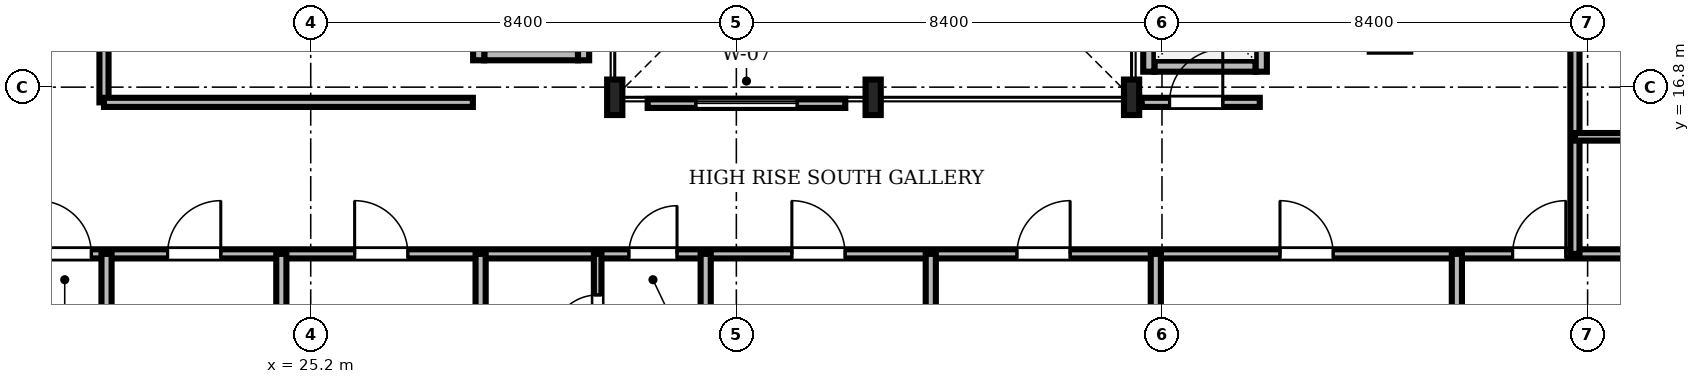
"""IFC4 building model, lengths in metres.
Left out: names, types, materials, properties, quantities, classifications, styles, units other than length and angle.
Written with IfcOpenShell. Run it as: python <this file> out.ifc"""

import sys

from ifc_helpers import new_model, si_unit, direction, frame, frame_2d, origin, origin_2d, place, context, subcontext, project, spatial, rectangle, i_section, extrude, source, transform, mapped, element, fill, save


model = new_model("IFC4")
c1 = context("Model", 3, precision=1e-05, world=origin(), true_north=direction((0.0, 1.0)))
c2 = subcontext(c1, "Body", "Model", "MODEL_VIEW")
j1 = project(units=[si_unit("LENGTHUNIT", "METRE"), si_unit("PLANEANGLEUNIT", "RADIAN")], contexts=[c1])
p1 = place(None, origin())
s1 = spatial("IfcSite", under=j1, at=p1, CompositionType="ELEMENT")
p2 = place(p1, origin())
s2 = spatial("IfcBuilding", under=s1, at=p2, CompositionType="ELEMENT")
p3 = place(p2, frame((0.0, 0.0, 214.8)))
s3 = spatial("IfcBuildingStorey", under=s2, at=p3, CompositionType="ELEMENT", Elevation=214.8)
m1 = source(origin(), c2, "Body", "SweptSolid", [
    extrude(i_section(OverallWidth=0.3, OverallDepth=0.7, WebThickness=0.017, FlangeThickness=0.032, FilletRadius=0.027, at=origin_2d()), origin(), (0.0, 0.0, 1.0), 3.53),
])
for number, where, z_axis, x_axis in (
    (1, (31.2, 16.6, 0.0), (0.0, 0.0, 1.0), (1.0, 0.0, 0.0)),
    (2, (36.3, 16.6, 0.0), (0.0, 0.0, 1.0), (1.0, 0.0, 0.0)),
    (3, (41.4, 16.6, 0.0), (0.0, 0.0, 1.0), (1.0, 0.0, 0.0)),
):
    element("IfcColumn", number, at=place(p3, frame(where, z_axis=z_axis, x_axis=x_axis)), inside=s3, PredefinedType="COLUMN", context=c2, shape_type="MappedRepresentation", body=[
        mapped(m1, transform((0.0, 0.0, 0.0), scale=1.0)),
    ])
m2 = source(origin(), c2, "Body", "SweptSolid", [
    extrude(rectangle(XDim=2.0, YDim=0.22, at=frame_2d((1.0, 0.0))), origin(), (0.0, 0.0, 1.0), 3.53),
])
p4 = place(p3, frame((41.85, 17.215, 0.0), z_axis=(0.0, 0.0, 1.0), x_axis=(1.0, 0.0, 0.0)))
e4 = element("IfcWall", 4, at=p4, inside=s3, PredefinedType="SOLIDWALL", context=c2, shape_type="MappedRepresentation", body=[
    mapped(m2, transform((0.0, 0.0, 0.0), scale=1.0)),
])
m3 = source(origin(), c2, "Body", "SweptSolid", [
    extrude(rectangle(XDim=2.19, YDim=0.22, at=frame_2d((1.095, 0.0))), origin(), (0.0, 0.0, 1.0), 3.53),
])
p5 = place(p3, frame((41.74, 17.105, 0.0), z_axis=(0.0, 0.0, 1.0), x_axis=(0.0, 1.0, 0.0)))
e5 = element("IfcWall", 5, at=p5, inside=s3, PredefinedType="SOLIDWALL", context=c2, shape_type="MappedRepresentation", body=[
    mapped(m3, transform((0.0, 0.0, 0.0), scale=1.0)),
])
p6 = place(p3, frame((43.96, 17.105, 0.0), z_axis=(0.0, 0.0, 1.0), x_axis=(0.0, 1.0, 0.0)))
e6 = element("IfcWall", 6, at=p6, inside=s3, PredefinedType="SOLIDWALL", context=c2, shape_type="MappedRepresentation", body=[
    mapped(m3, transform((0.0, 0.0, 0.0), scale=1.0)),
])
m4 = source(origin(), c2, "Body", "SweptSolid", [
    extrude(rectangle(XDim=1.1, YDim=2.2, at=frame_2d((0.55, 1.1))), frame((0.0, 0.12, 0.0), z_axis=(0.0, -1.0, 0.0), x_axis=(1.0, 0.0, 0.0)), (0.0, 0.0, 1.0), 0.24),
])
p7 = place(p6, frame((0.545, 0.0, 0.0)))
e7 = element("IfcOpeningElement", 7, at=p7, cuts=e6, PredefinedType="OPENING", context=c2, shape_type="MappedRepresentation", body=[
    mapped(m4, transform((0.0, 0.0, 0.0), scale=1.0)),
])
m5 = source(origin(), c2, "Body", "SweptSolid", [
    extrude(rectangle(XDim=1.85, YDim=0.22, at=frame_2d((0.925, 0.0))), origin(), (0.0, 0.0, 1.0), 2.972),
])
p8 = place(p3, frame((28.625, 17.44, 0.0), z_axis=(0.0, 0.0, 1.0), x_axis=(1.0, 0.0, 0.0)))
e8 = element("IfcWall", 8, at=p8, inside=s3, PredefinedType="SOLIDWALL", context=c2, shape_type="MappedRepresentation", body=[
    mapped(m5, transform((0.0, 0.0, 0.0), scale=1.0)),
])
m6 = source(origin(), c2, "Body", "SweptSolid", [
    extrude(rectangle(XDim=2.54, YDim=0.22, at=frame_2d((1.27, 0.0))), origin(), (0.0, 0.0, 1.0), 2.972),
])
p9 = place(p3, frame((28.515, 17.33, 0.0), z_axis=(0.0, 0.0, 1.0), x_axis=(0.0, 1.0, 0.0)))
e9 = element("IfcWall", 9, at=p9, inside=s3, PredefinedType="SOLIDWALL", context=c2, shape_type="MappedRepresentation", body=[
    mapped(m6, transform((0.0, 0.0, 0.0), scale=1.0)),
])
m7 = source(origin(), c2, "Body", "SweptSolid", [
    extrude(rectangle(XDim=2.54, YDim=0.22, at=frame_2d((1.27, 0.0))), origin(), (0.0, 0.0, 1.0), 3.53),
])
p10 = place(p3, frame((30.585, 17.33, 0.0), z_axis=(0.0, 0.0, 1.0), x_axis=(0.0, 1.0, 0.0)))
e10 = element("IfcWall", 10, at=p10, inside=s3, PredefinedType="SOLIDWALL", context=c2, shape_type="MappedRepresentation", body=[
    mapped(m7, transform((0.0, 0.0, 0.0), scale=1.0)),
])
m8 = source(origin(), c2, "Body", "SweptSolid", [
    extrude(rectangle(XDim=46.156, YDim=0.18, at=frame_2d((23.078, 0.0))), origin(), (0.0, 0.0, 1.0), 2.772),
])
p11 = place(p3, frame((11.422, 13.51, 0.0), z_axis=(0.0, 0.0, 1.0), x_axis=(1.0, 0.0, 0.0)))
e11 = element("IfcWall", 11, at=p11, inside=s3, PredefinedType="PARTITIONING", context=c2, shape_type="MappedRepresentation", body=[
    mapped(m8, transform((0.0, 0.0, 0.0), scale=1.0)),
])
m9 = source(origin(), c2, "Body", "SweptSolid", [
    extrude(rectangle(XDim=1.05, YDim=2.2, at=frame_2d((0.525, 1.1))), frame((0.0, 0.1, 0.0), z_axis=(0.0, -1.0, 0.0), x_axis=(1.0, 0.0, 0.0)), (0.0, 0.0, 1.0), 0.2),
])
p12 = place(p11, frame((8.398, 0.0, 0.0)))
e12 = element("IfcOpeningElement", 12, at=p12, cuts=e11, PredefinedType="OPENING", context=c2, shape_type="MappedRepresentation", body=[
    mapped(m9, transform((0.0, 0.0, 0.0), scale=1.0)),
])
p13 = place(p11, frame((10.953, 0.0, 0.0)))
e13 = element("IfcOpeningElement", 13, at=p13, cuts=e11, PredefinedType="OPENING", context=c2, shape_type="MappedRepresentation", body=[
    mapped(m9, transform((0.0, 0.0, 0.0), scale=1.0)),
])
p14 = place(p11, frame((14.645, 0.0, 0.0)))
e14 = element("IfcOpeningElement", 14, at=p14, cuts=e11, PredefinedType="OPENING", context=c2, shape_type="MappedRepresentation", body=[
    mapped(m9, transform((0.0, 0.0, 0.0), scale=1.0)),
])
m10 = source(origin(), c2, "Body", "SweptSolid", [
    extrude(rectangle(XDim=0.95, YDim=2.15, at=frame_2d((0.475, 1.075))), frame((0.0, 0.1, 0.0), z_axis=(0.0, -1.0, 0.0), x_axis=(1.0, 0.0, 0.0)), (0.0, 0.0, 1.0), 0.2),
])
p15 = place(p11, frame((20.057, 0.0, 0.0)))
e15 = element("IfcOpeningElement", 15, at=p15, cuts=e11, PredefinedType="OPENING", context=c2, shape_type="MappedRepresentation", body=[
    mapped(m10, transform((0.0, 0.0, 0.0), scale=1.0)),
])
p16 = place(p11, frame((23.274, 0.0, 0.0)))
e16 = element("IfcOpeningElement", 16, at=p16, cuts=e11, PredefinedType="OPENING", context=c2, shape_type="MappedRepresentation", body=[
    mapped(m9, transform((0.0, 0.0, 0.0), scale=1.0)),
])
p17 = place(p11, frame((27.716, 0.0, 0.0)))
e17 = element("IfcOpeningElement", 17, at=p17, cuts=e11, PredefinedType="OPENING", context=c2, shape_type="MappedRepresentation", body=[
    mapped(m9, transform((0.0, 0.0, 0.0), scale=1.0)),
])
p18 = place(p11, frame((32.907, 0.0, 0.0)))
e18 = element("IfcOpeningElement", 18, at=p18, cuts=e11, PredefinedType="OPENING", context=c2, shape_type="MappedRepresentation", body=[
    mapped(m9, transform((0.0, 0.0, 0.0), scale=1.0)),
])
p19 = place(p11, frame((37.498, 0.0, 0.0)))
e19 = element("IfcOpeningElement", 19, at=p19, cuts=e11, PredefinedType="OPENING", context=c2, shape_type="MappedRepresentation", body=[
    mapped(m9, transform((0.0, 0.0, 0.0), scale=1.0)),
])
m11 = source(origin(), c2, "Body", "SweptSolid", [
    extrude(rectangle(XDim=27.59, YDim=0.18, at=frame_2d((13.795, 0.0))), origin(), (0.0, 0.0, 1.0), 2.972),
])
p20 = place(p3, frame((50.15, 13.51, 0.0), z_axis=(0.0, 0.0, 1.0), x_axis=(0.0, 1.0, 0.0)))
e20 = element("IfcWall", 20, at=p20, inside=s3, PredefinedType="PARTITIONING", context=c2, shape_type="MappedRepresentation", body=[
    mapped(m11, transform((0.0, 0.0, 0.0), scale=1.0)),
])
p21 = place(p20, frame((4.086, 0.0, 0.0)))
e21 = element("IfcOpeningElement", 21, at=p21, cuts=e20, PredefinedType="OPENING", context=c2, shape_type="MappedRepresentation", body=[
    mapped(m9, transform((0.0, 0.0, 0.0), scale=1.0)),
])
p22 = place(p20, frame((9.744, 0.0, 0.0)))
e22 = element("IfcOpeningElement", 22, at=p22, cuts=e20, PredefinedType="OPENING", context=c2, shape_type="MappedRepresentation", body=[
    mapped(m9, transform((0.0, 0.0, 0.0), scale=1.0)),
])
p23 = place(p20, frame((17.771, 0.0, 0.0)))
e23 = element("IfcOpeningElement", 23, at=p23, cuts=e20, PredefinedType="OPENING", context=c2, shape_type="MappedRepresentation", body=[
    mapped(m9, transform((0.0, 0.0, 0.0), scale=1.0)),
])
p24 = place(p20, frame((24.614, 0.0, 0.0)))
e24 = element("IfcOpeningElement", 24, at=p24, cuts=e20, PredefinedType="OPENING", context=c2, shape_type="MappedRepresentation", body=[
    mapped(m9, transform((0.0, 0.0, 0.0), scale=1.0)),
])
m12 = source(origin(), c2, "Body", "SweptSolid", [
    extrude(rectangle(XDim=5.4, YDim=0.18, at=frame_2d((2.7, 0.0))), origin(), (0.0, 0.0, 1.0), 2.972),
])
p25 = place(p3, frame((21.12, 16.5, 0.0), z_axis=(0.0, 0.0, 1.0), x_axis=(0.0, 1.0, 0.0)))
e25 = element("IfcWall", 25, at=p25, inside=s3, PredefinedType="PARTITIONING", context=c2, shape_type="MappedRepresentation", body=[
    mapped(m12, transform((0.0, 0.0, 0.0), scale=1.0)),
])
p26 = place(p25, frame((2.0, 0.0, 0.0)))
e26 = element("IfcOpeningElement", 26, at=p26, cuts=e25, PredefinedType="OPENING", context=c2, shape_type="MappedRepresentation", body=[
    mapped(m9, transform((0.0, 0.0, 0.0), scale=1.0)),
])
m13 = source(origin(), c2, "Body", "SweptSolid", [
    extrude(rectangle(XDim=2.36, YDim=0.15, at=frame_2d((1.18, 0.0))), origin(), (0.0, 0.0, 1.0), 2.972),
])
p27 = place(p3, frame((30.863, 11.15, 0.0), z_axis=(0.0, 0.0, 1.0), x_axis=(0.0, 1.0, 0.0)))
e27 = element("IfcWall", 27, at=p27, inside=s3, PredefinedType="PARTITIONING", context=c2, shape_type="MappedRepresentation", body=[
    mapped(m13, transform((0.0, 0.0, 0.0), scale=1.0)),
])
m14 = source(origin(), c2, "Body", "SweptSolid", [
    extrude(rectangle(XDim=0.9, YDim=2.1, at=frame_2d((0.45, 1.05))), frame((0.0, 0.085, 0.0), z_axis=(0.0, -1.0, 0.0), x_axis=(1.0, 0.0, 0.0)), (0.0, 0.0, 1.0), 0.17),
])
p28 = place(p27, frame((0.65, 0.0, 0.0)))
e28 = element("IfcOpeningElement", 28, at=p28, cuts=e27, PredefinedType="OPENING", context=c2, shape_type="MappedRepresentation", body=[
    mapped(m14, transform((0.0, 0.0, 0.0), scale=1.0)),
])
m15 = source(origin(), c2, "Body", "SweptSolid", [
    extrude(rectangle(XDim=2.33, YDim=0.18, at=frame_2d((1.165, 0.0))), origin(), (0.0, 0.0, 1.0), 2.972),
])
p29 = place(p3, frame((41.6, 16.5, 0.0), z_axis=(0.0, 0.0, 1.0), x_axis=(1.0, 0.0, 0.0)))
e29 = element("IfcWall", 29, at=p29, inside=s3, PredefinedType="PARTITIONING", context=c2, shape_type="MappedRepresentation", body=[
    mapped(m15, transform((0.0, 0.0, 0.0), scale=1.0)),
])
p30 = place(p29, frame((0.55, 0.0, 0.0)))
e30 = element("IfcOpeningElement", 30, at=p30, cuts=e29, PredefinedType="OPENING", context=c2, shape_type="MappedRepresentation", body=[
    mapped(m9, transform((0.0, 0.0, 0.0), scale=1.0)),
])
m16 = source(origin(), c2, "Body", "SweptSolid", [
    extrude(rectangle(XDim=11.388, YDim=0.2, at=frame_2d((5.694, 0.0))), origin(), (0.0, 0.0, 1.0), 2.772),
])
for number, where, z_axis, x_axis in (
    (31, (21.17, 2.122, 0.0), (0.0, 0.0, 1.0), (0.0, 1.0, 0.0)),
    (32, (24.62, 2.122, 0.0), (0.0, 0.0, 1.0), (0.0, 1.0, 0.0)),
    (33, (28.553, 2.122, 0.0), (0.0, 0.0, 1.0), (0.0, 1.0, 0.0)),
):
    element("IfcWall", number, at=place(p3, frame(where, z_axis=z_axis, x_axis=x_axis)), inside=s3, PredefinedType="PARTITIONING", context=c2, shape_type="MappedRepresentation", body=[
        mapped(m16, transform((0.0, 0.0, 0.0), scale=1.0)),
    ])
m17 = source(origin(), c2, "Body", "SweptSolid", [
    extrude(rectangle(XDim=11.58, YDim=0.2, at=frame_2d((5.79, 0.0))), origin(), (0.0, 0.0, 1.0), 2.772),
])
for number, where, z_axis, x_axis in (
    (34, (32.995, 1.93, 0.0), (0.0, 0.0, 1.0), (0.0, 1.0, 0.0)),
    (35, (37.437, 1.93, 0.0), (0.0, 0.0, 1.0), (0.0, 1.0, 0.0)),
):
    element("IfcWall", number, at=place(p3, frame(where, z_axis=z_axis, x_axis=x_axis)), inside=s3, PredefinedType="PARTITIONING", context=c2, shape_type="MappedRepresentation", body=[
        mapped(m17, transform((0.0, 0.0, 0.0), scale=1.0)),
    ])
for number, where, z_axis, x_axis in (
    (36, (41.878, 2.122, 0.0), (0.0, 0.0, 1.0), (0.0, 1.0, 0.0)),
    (37, (47.82, 2.122, 0.0), (0.0, 0.0, 1.0), (0.0, 1.0, 0.0)),
):
    element("IfcWall", number, at=place(p3, frame(where, z_axis=z_axis, x_axis=x_axis)), inside=s3, PredefinedType="PARTITIONING", context=c2, shape_type="MappedRepresentation", body=[
        mapped(m16, transform((0.0, 0.0, 0.0), scale=1.0)),
    ])
m18 = source(origin(), c2, "Body", "SweptSolid", [
    extrude(rectangle(XDim=7.28, YDim=0.18, at=frame_2d((3.64, 0.0))), origin(), (0.0, 0.0, 1.0), 3.53),
])
p31 = place(p3, frame((21.12, 16.5, 0.0), z_axis=(0.0, 0.0, 1.0), x_axis=(1.0, 0.0, 0.0)))
e38 = element("IfcWall", 38, at=p31, inside=s3, PredefinedType="PARTITIONING", context=c2, shape_type="MappedRepresentation", body=[
    mapped(m18, transform((0.0, 0.0, 0.0), scale=1.0)),
])
m19 = source(origin(), c2, "Body", "SweptSolid", [
    extrude(rectangle(XDim=2.36, YDim=0.15, at=frame_2d((1.18, 0.0))), origin(), (0.0, 0.0, 1.0), 3.53),
])
p32 = place(p3, frame((50.15, 15.82, 0.0), z_axis=(0.0, 0.0, 1.0), x_axis=(1.0, 0.0, 0.0)))
e39 = element("IfcWall", 39, at=p32, inside=s3, PredefinedType="PARTITIONING", context=c2, shape_type="MappedRepresentation", body=[
    mapped(m19, transform((0.0, 0.0, 0.0), scale=1.0)),
])
m20 = source(origin(), c2, "Body", "SweptSolid", [
    extrude(rectangle(XDim=3.9, YDim=0.18, at=frame_2d((1.95, 0.0))), origin(), (0.0, 0.0, 1.0), 3.072),
])
p33 = place(p3, frame((31.85, 16.48, 0.0), z_axis=(0.0, 0.0, 1.0), x_axis=(1.0, 0.0, 0.0)))
e40 = element("IfcWall", 40, at=p33, inside=s3, PredefinedType="PARTITIONING", context=c2, shape_type="MappedRepresentation", body=[
    mapped(m20, transform((0.0, 0.0, 0.0), scale=1.0)),
])
m21 = source(origin(), c2, "Body", "SweptSolid", [
    extrude(rectangle(XDim=2.0, YDim=1.9, at=frame_2d((1.0, 0.95))), frame((0.0, 0.1, 0.0), z_axis=(0.0, -1.0, 0.0), x_axis=(1.0, 0.0, 0.0)), (0.0, 0.0, 1.0), 0.2),
])
p34 = place(p33, frame((0.95, 0.0, 0.55)))
e41 = element("IfcOpeningElement", 41, at=p34, cuts=e40, PredefinedType="OPENING", context=c2, shape_type="MappedRepresentation", body=[
    mapped(m21, transform((0.0, 0.0, 0.0), scale=1.0)),
])
m22 = source(origin(), c2, "Body", "SweptSolid", [
    extrude(rectangle(XDim=1.05, YDim=2.2, at=frame_2d((0.525, 1.1))), frame((0.0, 0.025, 0.0), z_axis=(0.0, -1.0, 0.0), x_axis=(1.0, 0.0, 0.0)), (0.0, 0.0, 1.0), 0.05),
])
p35 = place(p12, origin())
e42 = element("IfcDoor", 42, at=p35, inside=s3, OperationType="SINGLE_SWING_LEFT", PredefinedType="DOOR", context=c2, shape_type="MappedRepresentation", body=[
    mapped(m22, transform((0.0, 0.0, 0.0), scale=1.0)),
])
fill(e12, e42)
p36 = place(p13, origin())
e43 = element("IfcDoor", 43, at=p36, inside=s3, OperationType="SINGLE_SWING_RIGHT", PredefinedType="DOOR", context=c2, shape_type="MappedRepresentation", body=[
    mapped(m22, transform((0.0, 0.0, 0.0), scale=1.0)),
])
fill(e13, e43)
p37 = place(p14, origin())
e44 = element("IfcDoor", 44, at=p37, inside=s3, OperationType="SINGLE_SWING_LEFT", PredefinedType="DOOR", context=c2, shape_type="MappedRepresentation", body=[
    mapped(m22, transform((0.0, 0.0, 0.0), scale=1.0)),
])
fill(e14, e44)
m23 = source(origin(), c2, "Body", "SweptSolid", [
    extrude(rectangle(XDim=0.95, YDim=2.15, at=frame_2d((0.475, 1.075))), frame((0.0, 0.025, 0.0), z_axis=(0.0, -1.0, 0.0), x_axis=(1.0, 0.0, 0.0)), (0.0, 0.0, 1.0), 0.05),
])
p38 = place(p15, origin())
e45 = element("IfcDoor", 45, at=p38, inside=s3, OperationType="SINGLE_SWING_RIGHT", PredefinedType="DOOR", context=c2, shape_type="MappedRepresentation", body=[
    mapped(m23, transform((0.0, 0.0, 0.0), scale=1.0)),
])
fill(e15, e45)
p39 = place(p16, origin())
e46 = element("IfcDoor", 46, at=p39, inside=s3, OperationType="SINGLE_SWING_LEFT", PredefinedType="DOOR", context=c2, shape_type="MappedRepresentation", body=[
    mapped(m22, transform((0.0, 0.0, 0.0), scale=1.0)),
])
fill(e16, e46)
p40 = place(p17, origin())
e47 = element("IfcDoor", 47, at=p40, inside=s3, OperationType="SINGLE_SWING_RIGHT", PredefinedType="DOOR", context=c2, shape_type="MappedRepresentation", body=[
    mapped(m22, transform((0.0, 0.0, 0.0), scale=1.0)),
])
fill(e17, e47)
p41 = place(p18, origin())
e48 = element("IfcDoor", 48, at=p41, inside=s3, OperationType="SINGLE_SWING_LEFT", PredefinedType="DOOR", context=c2, shape_type="MappedRepresentation", body=[
    mapped(m22, transform((0.0, 0.0, 0.0), scale=1.0)),
])
fill(e18, e48)
p42 = place(p19, origin())
e49 = element("IfcDoor", 49, at=p42, inside=s3, OperationType="SINGLE_SWING_RIGHT", PredefinedType="DOOR", context=c2, shape_type="MappedRepresentation", body=[
    mapped(m22, transform((0.0, 0.0, 0.0), scale=1.0)),
])
fill(e19, e49)
m24 = source(origin(), c2, "Body", "SweptSolid", [
    extrude(rectangle(XDim=0.9, YDim=2.1, at=frame_2d((0.45, 1.05))), frame((0.0, 0.025, 0.0), z_axis=(0.0, -1.0, 0.0), x_axis=(1.0, 0.0, 0.0)), (0.0, 0.0, 1.0), 0.05),
])
p43 = place(p28, origin())
e50 = element("IfcDoor", 50, at=p43, inside=s3, OperationType="SINGLE_SWING_LEFT", PredefinedType="DOOR", context=c2, shape_type="MappedRepresentation", body=[
    mapped(m24, transform((0.0, 0.0, 0.0), scale=1.0)),
])
fill(e28, e50)
p44 = place(p30, origin())
e51 = element("IfcDoor", 51, at=p44, inside=s3, OperationType="SINGLE_SWING_RIGHT", PredefinedType="DOOR", context=c2, shape_type="MappedRepresentation", body=[
    mapped(m22, transform((0.0, 0.0, 0.0), scale=1.0)),
])
fill(e30, e51)
m25 = source(origin(), c2, "Body", "SweptSolid", [
    extrude(rectangle(XDim=2.0, YDim=1.9, at=frame_2d((1.0, 0.95))), frame((0.0, 0.03, 0.0), z_axis=(0.0, -1.0, 0.0), x_axis=(1.0, 0.0, 0.0)), (0.0, 0.0, 1.0), 0.06),
])
p45 = place(p34, origin())
e52 = element("IfcWindow", 52, at=p45, inside=s3, PartitioningType="SINGLE_PANEL", PredefinedType="WINDOW", context=c2, shape_type="MappedRepresentation", body=[
    mapped(m25, transform((0.0, 0.0, 0.0), scale=1.0)),
])
fill(e41, e52)
save(model, sys.argv[1])
